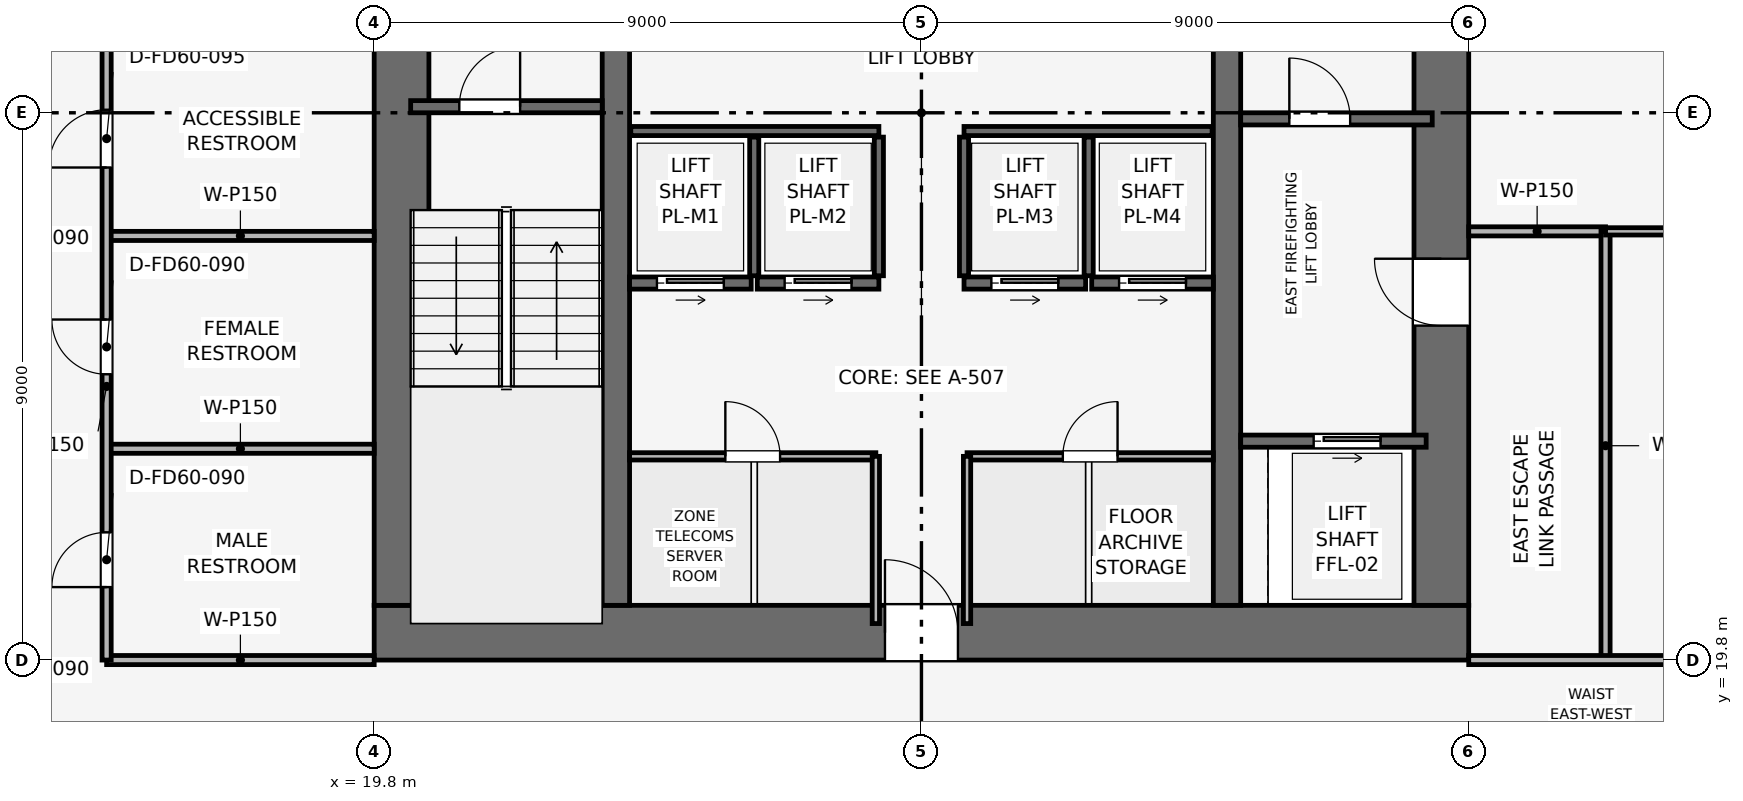
"""IFC4 building model, lengths in metres.
Left out: names, types, materials, properties, quantities, classifications, styles, units other than length and angle.
Written with IfcOpenShell. Run it as: python <this file> out.ifc"""

import sys

from ifc_helpers import new_model, si_unit, direction, frame, frame_2d, origin, place, context, subcontext, project, spatial, rectangle, extrude, element, fill, save


model = new_model("IFC4")
c1 = context("Model", 3, precision=1e-05, world=origin(), true_north=direction((0.0, 1.0)))
c2 = subcontext(c1, "Body", "Model", "MODEL_VIEW")
j1 = project(units=[si_unit("LENGTHUNIT", "METRE"), si_unit("PLANEANGLEUNIT", "RADIAN")], contexts=[c1])
p1 = place(None, origin())
s1 = spatial("IfcSite", under=j1, at=p1, CompositionType="ELEMENT")
p2 = place(p1, origin())
s2 = spatial("IfcBuilding", under=s1, at=p2, CompositionType="ELEMENT")
p3 = place(p2, frame((0.0, 0.0, 160.8)))
s3 = spatial("IfcBuildingStorey", under=s2, at=p3, CompositionType="ELEMENT", Elevation=160.8)
p4 = place(p3, frame((19.8, 20.25, 0.0), z_axis=(0.0, 0.0, 1.0), x_axis=(1.0, 0.0, 0.0)))
e1 = element("IfcWall", 1, at=p4, inside=s3, PredefinedType="SHEAR", context=c2, shape_type="SweptSolid", body=[
    extrude(rectangle(XDim=18.0, YDim=0.9, at=frame_2d((9.0, 0.0))), origin(), (0.0, 0.0, 1.0), 3.75),
])
p5 = place(p4, frame((8.4, 0.0, 0.0)))
e2 = element("IfcOpeningElement", 2, at=p5, cuts=e1, PredefinedType="OPENING", context=c2, shape_type="SweptSolid", body=[
    extrude(rectangle(XDim=1.2, YDim=2.2, at=frame_2d((0.6, 1.1))), frame((0.0, 0.46, 0.0), z_axis=(0.0, -1.0, 0.0), x_axis=(1.0, 0.0, 0.0)), (0.0, 0.0, 1.0), 0.92),
])
p6 = place(p3, frame((20.25, 20.7, 0.0), z_axis=(0.0, 0.0, 1.0), x_axis=(0.0, 1.0, 0.0)))
e3 = element("IfcWall", 3, at=p6, inside=s3, PredefinedType="SHEAR", context=c2, shape_type="SweptSolid", body=[
    extrude(rectangle(XDim=16.2, YDim=0.9, at=frame_2d((8.1, 0.0))), origin(), (0.0, 0.0, 1.0), 3.75),
])
p7 = place(p6, frame((10.1, 0.0, 0.0)))
e4 = element("IfcOpeningElement", 4, at=p7, cuts=e3, PredefinedType="OPENING", context=c2, shape_type="SweptSolid", body=[
    extrude(rectangle(XDim=1.1, YDim=2.15, at=frame_2d((0.55, 1.075))), frame((0.0, 0.46, 0.0), z_axis=(0.0, -1.0, 0.0), x_axis=(1.0, 0.0, 0.0)), (0.0, 0.0, 1.0), 0.92),
])
p8 = place(p3, frame((37.35, 20.7, 0.0), z_axis=(0.0, 0.0, 1.0), x_axis=(0.0, 1.0, 0.0)))
e5 = element("IfcWall", 5, at=p8, inside=s3, PredefinedType="SHEAR", context=c2, shape_type="SweptSolid", body=[
    extrude(rectangle(XDim=16.2, YDim=0.9, at=frame_2d((8.1, 0.0))), origin(), (0.0, 0.0, 1.0), 3.75),
])
p9 = place(p8, frame((4.6, 0.0, 0.0)))
e6 = element("IfcOpeningElement", 6, at=p9, cuts=e5, PredefinedType="OPENING", context=c2, shape_type="SweptSolid", body=[
    extrude(rectangle(XDim=1.1, YDim=2.15, at=frame_2d((0.55, 1.075))), frame((0.0, 0.46, 0.0), z_axis=(0.0, -1.0, 0.0), x_axis=(1.0, 0.0, 0.0)), (0.0, 0.0, 1.0), 0.92),
])
for number, where, z_axis, x_axis in (
    (7, (23.775, 20.7, 0.0), (0.0, 0.0, 1.0), (0.0, 1.0, 0.0)),
    (8, (33.825, 20.7, 0.0), (0.0, 0.0, 1.0), (0.0, 1.0, 0.0)),
):
    element("IfcWall", number, at=place(p3, frame(where, z_axis=z_axis, x_axis=x_axis)), inside=s3, PredefinedType="SHEAR", context=c2, shape_type="SweptSolid", body=[
        extrude(rectangle(XDim=16.2, YDim=0.45, at=frame_2d((8.1, 0.0))), origin(), (0.0, 0.0, 1.0), 3.75),
    ])
p10 = place(p3, frame((20.4, 28.9, 0.0), z_axis=(0.0, 0.0, 1.0), x_axis=(1.0, 0.0, 0.0)))
e9 = element("IfcWall", 9, at=p10, inside=s3, PredefinedType="SHEAR", context=c2, shape_type="SweptSolid", body=[
    extrude(rectangle(XDim=3.15, YDim=0.2, at=frame_2d((1.575, 0.0))), origin(), (0.0, 0.0, 1.0), 3.495),
])
p11 = place(p10, frame((0.8, 0.0, 0.0)))
e10 = element("IfcOpeningElement", 10, at=p11, cuts=e9, PredefinedType="OPENING", context=c2, shape_type="SweptSolid", body=[
    extrude(rectangle(XDim=1.0, YDim=2.1, at=frame_2d((0.5, 1.05))), frame((0.0, 0.11, 0.0), z_axis=(0.0, -1.0, 0.0), x_axis=(1.0, 0.0, 0.0)), (0.0, 0.0, 1.0), 0.22),
])
p12 = place(p3, frame((34.05, 28.7, 0.0), z_axis=(0.0, 0.0, 1.0), x_axis=(1.0, 0.0, 0.0)))
e11 = element("IfcWall", 11, at=p12, inside=s3, PredefinedType="SHEAR", context=c2, shape_type="SweptSolid", body=[
    extrude(rectangle(XDim=3.15, YDim=0.2, at=frame_2d((1.575, 0.0))), origin(), (0.0, 0.0, 1.0), 3.495),
])
p13 = place(p12, frame((0.8, 0.0, 0.0)))
e12 = element("IfcOpeningElement", 12, at=p13, cuts=e11, PredefinedType="OPENING", context=c2, shape_type="SweptSolid", body=[
    extrude(rectangle(XDim=1.0, YDim=2.1, at=frame_2d((0.5, 1.05))), frame((0.0, 0.11, 0.0), z_axis=(0.0, -1.0, 0.0), x_axis=(1.0, 0.0, 0.0)), (0.0, 0.0, 1.0), 0.22),
])
p14 = place(p3, frame((34.05, 23.4, 0.0), z_axis=(0.0, 0.0, 1.0), x_axis=(1.0, 0.0, 0.0)))
e13 = element("IfcWall", 13, at=p14, inside=s3, PredefinedType="SHEAR", context=c2, shape_type="SweptSolid", body=[
    extrude(rectangle(XDim=3.05, YDim=0.2, at=frame_2d((1.525, 0.0))), origin(), (0.0, 0.0, 1.0), 3.495),
])
p15 = place(p14, frame((1.2, 0.0, 0.0)))
e14 = element("IfcOpeningElement", 14, at=p15, cuts=e13, PredefinedType="OPENING", context=c2, shape_type="SweptSolid", body=[
    extrude(rectangle(XDim=1.1, YDim=2.15, at=frame_2d((0.55, 1.075))), frame((0.0, 0.11, 0.0), z_axis=(0.0, -1.0, 0.0), x_axis=(1.0, 0.0, 0.0)), (0.0, 0.0, 1.0), 0.22),
])
p16 = place(p3, frame((24.0, 26.0, 0.0), z_axis=(0.0, 0.0, 1.0), x_axis=(1.0, 0.0, 0.0)))
e15 = element("IfcWall", 15, at=p16, inside=s3, PredefinedType="SHEAR", context=c2, shape_type="SweptSolid", body=[
    extrude(rectangle(XDim=2.0, YDim=0.2, at=frame_2d((1.0, 0.0))), origin(), (0.0, 0.0, 1.0), 3.495),
])
p17 = place(p16, frame((0.45, 0.0, 0.0)))
e16 = element("IfcOpeningElement", 16, at=p17, cuts=e15, PredefinedType="OPENING", context=c2, shape_type="SweptSolid", body=[
    extrude(rectangle(XDim=1.1, YDim=2.15, at=frame_2d((0.55, 1.075))), frame((0.0, 0.11, 0.0), z_axis=(0.0, -1.0, 0.0), x_axis=(1.0, 0.0, 0.0)), (0.0, 0.0, 1.0), 0.22),
])
p18 = place(p3, frame((26.1, 26.0, 0.0), z_axis=(0.0, 0.0, 1.0), x_axis=(1.0, 0.0, 0.0)))
e17 = element("IfcWall", 17, at=p18, inside=s3, PredefinedType="SHEAR", context=c2, shape_type="SweptSolid", body=[
    extrude(rectangle(XDim=2.0, YDim=0.2, at=frame_2d((1.0, 0.0))), origin(), (0.0, 0.0, 1.0), 3.495),
])
p19 = place(p18, frame((0.45, 0.0, 0.0)))
e18 = element("IfcOpeningElement", 18, at=p19, cuts=e17, PredefinedType="OPENING", context=c2, shape_type="SweptSolid", body=[
    extrude(rectangle(XDim=1.1, YDim=2.15, at=frame_2d((0.55, 1.075))), frame((0.0, 0.11, 0.0), z_axis=(0.0, -1.0, 0.0), x_axis=(1.0, 0.0, 0.0)), (0.0, 0.0, 1.0), 0.22),
])
p20 = place(p3, frame((29.5, 26.0, 0.0), z_axis=(0.0, 0.0, 1.0), x_axis=(1.0, 0.0, 0.0)))
e19 = element("IfcWall", 19, at=p20, inside=s3, PredefinedType="SHEAR", context=c2, shape_type="SweptSolid", body=[
    extrude(rectangle(XDim=2.0, YDim=0.2, at=frame_2d((1.0, 0.0))), origin(), (0.0, 0.0, 1.0), 3.495),
])
p21 = place(p20, frame((0.45, 0.0, 0.0)))
e20 = element("IfcOpeningElement", 20, at=p21, cuts=e19, PredefinedType="OPENING", context=c2, shape_type="SweptSolid", body=[
    extrude(rectangle(XDim=1.1, YDim=2.15, at=frame_2d((0.55, 1.075))), frame((0.0, 0.11, 0.0), z_axis=(0.0, -1.0, 0.0), x_axis=(1.0, 0.0, 0.0)), (0.0, 0.0, 1.0), 0.22),
])
p22 = place(p3, frame((31.6, 26.0, 0.0), z_axis=(0.0, 0.0, 1.0), x_axis=(1.0, 0.0, 0.0)))
e21 = element("IfcWall", 21, at=p22, inside=s3, PredefinedType="SHEAR", context=c2, shape_type="SweptSolid", body=[
    extrude(rectangle(XDim=2.0, YDim=0.2, at=frame_2d((1.0, 0.0))), origin(), (0.0, 0.0, 1.0), 3.495),
])
p23 = place(p22, frame((0.45, 0.0, 0.0)))
e22 = element("IfcOpeningElement", 22, at=p23, cuts=e21, PredefinedType="OPENING", context=c2, shape_type="SweptSolid", body=[
    extrude(rectangle(XDim=1.1, YDim=2.15, at=frame_2d((0.55, 1.075))), frame((0.0, 0.11, 0.0), z_axis=(0.0, -1.0, 0.0), x_axis=(1.0, 0.0, 0.0)), (0.0, 0.0, 1.0), 0.22),
])
for number, where, z_axis, x_axis in (
    (23, (24.02, 28.5, 0.0), (0.0, 0.0, 1.0), (1.0, 0.0, 0.0)),
    (24, (29.5, 28.5, 0.0), (0.0, 0.0, 1.0), (1.0, 0.0, 0.0)),
):
    element("IfcWall", number, at=place(p3, frame(where, z_axis=z_axis, x_axis=x_axis)), inside=s3, PredefinedType="SHEAR", context=c2, shape_type="SweptSolid", body=[
        extrude(rectangle(XDim=4.08, YDim=0.15, at=frame_2d((2.04, 0.0))), origin(), (0.0, 0.0, 1.0), 3.495),
    ])
for number, where, z_axis, x_axis in (
    (25, (26.05, 26.12, 0.0), (0.0, 0.0, 1.0), (0.0, 1.0, 0.0)),
    (26, (28.1, 26.12, 0.0), (0.0, 0.0, 1.0), (0.0, 1.0, 0.0)),
    (27, (29.5, 26.12, 0.0), (0.0, 0.0, 1.0), (0.0, 1.0, 0.0)),
    (28, (31.55, 26.12, 0.0), (0.0, 0.0, 1.0), (0.0, 1.0, 0.0)),
):
    element("IfcWall", number, at=place(p3, frame(where, z_axis=z_axis, x_axis=x_axis)), inside=s3, PredefinedType="SHEAR", context=c2, shape_type="SweptSolid", body=[
        extrude(rectangle(XDim=2.28, YDim=0.15, at=frame_2d((1.14, 0.0))), origin(), (0.0, 0.0, 1.0), 3.495),
    ])
p24 = place(p3, frame((24.0, 23.15, 0.0), z_axis=(0.0, 0.0, 1.0), x_axis=(1.0, 0.0, 0.0)))
e29 = element("IfcWall", 29, at=p24, inside=s3, PredefinedType="PARTITIONING", context=c2, shape_type="SweptSolid", body=[
    extrude(rectangle(XDim=4.05, YDim=0.12, at=frame_2d((2.025, 0.0))), origin(), (0.0, 0.0, 1.0), 3.495),
])
p25 = place(p24, frame((1.575, 0.0, 0.0)))
e30 = element("IfcOpeningElement", 30, at=p25, cuts=e29, PredefinedType="OPENING", context=c2, shape_type="SweptSolid", body=[
    extrude(rectangle(XDim=0.9, YDim=2.1, at=frame_2d((0.45, 1.05))), frame((0.0, 0.07, 0.0), z_axis=(0.0, -1.0, 0.0), x_axis=(1.0, 0.0, 0.0)), (0.0, 0.0, 1.0), 0.14),
])
p26 = place(p3, frame((28.05, 20.4, 0.0), z_axis=(0.0, 0.0, 1.0), x_axis=(0.0, 1.0, 0.0)))
e31 = element("IfcWall", 31, at=p26, inside=s3, PredefinedType="PARTITIONING", context=c2, shape_type="SweptSolid", body=[
    extrude(rectangle(XDim=2.75, YDim=0.12, at=frame_2d((1.375, 0.0))), origin(), (0.0, 0.0, 1.0), 3.495),
])
p27 = place(p3, frame((29.55, 23.15, 0.0), z_axis=(0.0, 0.0, 1.0), x_axis=(1.0, 0.0, 0.0)))
e32 = element("IfcWall", 32, at=p27, inside=s3, PredefinedType="PARTITIONING", context=c2, shape_type="SweptSolid", body=[
    extrude(rectangle(XDim=4.05, YDim=0.12, at=frame_2d((2.025, 0.0))), origin(), (0.0, 0.0, 1.0), 3.495),
])
p28 = place(p27, frame((1.575, 0.0, 0.0)))
e33 = element("IfcOpeningElement", 33, at=p28, cuts=e32, PredefinedType="OPENING", context=c2, shape_type="SweptSolid", body=[
    extrude(rectangle(XDim=0.9, YDim=2.1, at=frame_2d((0.45, 1.05))), frame((0.0, 0.07, 0.0), z_axis=(0.0, -1.0, 0.0), x_axis=(1.0, 0.0, 0.0)), (0.0, 0.0, 1.0), 0.14),
])
p29 = place(p3, frame((29.55, 20.4, 0.0), z_axis=(0.0, 0.0, 1.0), x_axis=(0.0, 1.0, 0.0)))
e34 = element("IfcWall", 34, at=p29, inside=s3, PredefinedType="PARTITIONING", context=c2, shape_type="SweptSolid", body=[
    extrude(rectangle(XDim=2.75, YDim=0.12, at=frame_2d((1.375, 0.0))), origin(), (0.0, 0.0, 1.0), 3.495),
])
p30 = place(p3, frame((15.4, 19.8, 0.0), z_axis=(0.0, 0.0, 1.0), x_axis=(1.0, 0.0, 0.0)))
e35 = element("IfcWall", 35, at=p30, inside=s3, PredefinedType="PARTITIONING", context=c2, shape_type="SweptSolid", body=[
    extrude(rectangle(XDim=4.4, YDim=0.15, at=frame_2d((2.2, 0.0))), origin(), (0.0, 0.0, 1.0), 3.03),
])
for number, where, z_axis, x_axis in (
    (36, (15.4, 23.275, 0.0), (0.0, 0.0, 1.0), (1.0, 0.0, 0.0)),
    (37, (15.4, 26.775, 0.0), (0.0, 0.0, 1.0), (1.0, 0.0, 0.0)),
):
    element("IfcWall", number, at=place(p3, frame(where, z_axis=z_axis, x_axis=x_axis)), inside=s3, PredefinedType="PARTITIONING", context=c2, shape_type="SweptSolid", body=[
        extrude(rectangle(XDim=4.4, YDim=0.15, at=frame_2d((2.2, 0.0))), origin(), (0.0, 0.0, 1.0), 3.495),
    ])
p31 = place(p3, frame((15.4, 19.8, 0.0), z_axis=(0.0, 0.0, 1.0), x_axis=(0.0, 1.0, 0.0)))
e38 = element("IfcWall", 38, at=p31, inside=s3, PredefinedType="PARTITIONING", context=c2, shape_type="SweptSolid", body=[
    extrude(rectangle(XDim=10.35, YDim=0.15, at=frame_2d((5.175, 0.0))), origin(), (0.0, 0.0, 1.0), 3.03),
])
p32 = place(p31, frame((1.2, 0.0, 0.0)))
e39 = element("IfcOpeningElement", 39, at=p32, cuts=e38, PredefinedType="OPENING", context=c2, shape_type="SweptSolid", body=[
    extrude(rectangle(XDim=0.9, YDim=2.1, at=frame_2d((0.45, 1.05))), frame((0.0, 0.085, 0.0), z_axis=(0.0, -1.0, 0.0), x_axis=(1.0, 0.0, 0.0)), (0.0, 0.0, 1.0), 0.17),
])
p33 = place(p31, frame((4.7, 0.0, 0.0)))
e40 = element("IfcOpeningElement", 40, at=p33, cuts=e38, PredefinedType="OPENING", context=c2, shape_type="SweptSolid", body=[
    extrude(rectangle(XDim=0.9, YDim=2.1, at=frame_2d((0.45, 1.05))), frame((0.0, 0.085, 0.0), z_axis=(0.0, -1.0, 0.0), x_axis=(1.0, 0.0, 0.0)), (0.0, 0.0, 1.0), 0.17),
])
p34 = place(p31, frame((8.1, 0.0, 0.0)))
e41 = element("IfcOpeningElement", 41, at=p34, cuts=e38, PredefinedType="OPENING", context=c2, shape_type="SweptSolid", body=[
    extrude(rectangle(XDim=0.95, YDim=2.1, at=frame_2d((0.475, 1.05))), frame((0.0, 0.085, 0.0), z_axis=(0.0, -1.0, 0.0), x_axis=(1.0, 0.0, 0.0)), (0.0, 0.0, 1.0), 0.17),
])
p35 = place(p3, frame((37.8, 26.85, 0.0), z_axis=(0.0, 0.0, 1.0), x_axis=(1.0, 0.0, 0.0)))
e42 = element("IfcWall", 42, at=p35, inside=s3, PredefinedType="PARTITIONING", context=c2, shape_type="SweptSolid", body=[
    extrude(rectangle(XDim=2.25, YDim=0.15, at=frame_2d((1.125, 0.0))), origin(), (0.0, 0.0, 1.0), 3.495),
])
p36 = place(p3, frame((40.05, 19.8, 0.0), z_axis=(0.0, 0.0, 1.0), x_axis=(0.0, 1.0, 0.0)))
e43 = element("IfcWall", 43, at=p36, inside=s3, PredefinedType="PARTITIONING", context=c2, shape_type="SweptSolid", body=[
    extrude(rectangle(XDim=7.05, YDim=0.15, at=frame_2d((3.525, 0.0))), origin(), (0.0, 0.0, 1.0), 3.03),
])
p37 = place(p3, frame((40.05, 26.85, 0.0), z_axis=(0.0, 0.0, 1.0), x_axis=(1.0, 0.0, 0.0)))
e44 = element("IfcWall", 44, at=p37, inside=s3, PredefinedType="PARTITIONING", context=c2, shape_type="SweptSolid", body=[
    extrude(rectangle(XDim=12.92, YDim=0.12, at=frame_2d((6.46, 0.0))), origin(), (0.0, 0.0, 1.0), 2.98),
])
p38 = place(p37, frame((6.01, 0.0, 0.0)))
e45 = element("IfcOpeningElement", 45, at=p38, cuts=e44, PredefinedType="OPENING", context=c2, shape_type="SweptSolid", body=[
    extrude(rectangle(XDim=0.9, YDim=2.1, at=frame_2d((0.45, 1.05))), frame((0.0, 0.07, 0.0), z_axis=(0.0, -1.0, 0.0), x_axis=(1.0, 0.0, 0.0)), (0.0, 0.0, 1.0), 0.14),
])
p39 = place(p3, frame((37.8, 19.8, 0.0), z_axis=(0.0, 0.0, 1.0), x_axis=(1.0, 0.0, 0.0)))
e46 = element("IfcWall", 46, at=p39, inside=s3, PredefinedType="PARTITIONING", context=c2, shape_type="SweptSolid", body=[
    extrude(rectangle(XDim=15.17, YDim=0.15, at=frame_2d((7.585, 0.0))), origin(), (0.0, 0.0, 1.0), 2.98),
])
p40 = place(p39, frame((4.4, 0.0, 0.0)))
e47 = element("IfcOpeningElement", 47, at=p40, cuts=e46, PredefinedType="OPENING", context=c2, shape_type="SweptSolid", body=[
    extrude(rectangle(XDim=0.9, YDim=2.1, at=frame_2d((0.45, 1.05))), frame((0.0, 0.085, 0.0), z_axis=(0.0, -1.0, 0.0), x_axis=(1.0, 0.0, 0.0)), (0.0, 0.0, 1.0), 0.17),
])
p41 = place(p11, origin())
e48 = element("IfcDoor", 48, at=p41, inside=s3, OperationType="SINGLE_SWING_RIGHT", PredefinedType="DOOR", context=c2, shape_type="SweptSolid", body=[
    extrude(rectangle(XDim=1.0, YDim=2.1, at=frame_2d((0.5, 1.05))), frame((0.0, 0.025, 0.0), z_axis=(0.0, -1.0, 0.0), x_axis=(1.0, 0.0, 0.0)), (0.0, 0.0, 1.0), 0.05),
])
fill(e10, e48)
p42 = place(p13, origin())
e49 = element("IfcDoor", 49, at=p42, inside=s3, OperationType="SINGLE_SWING_LEFT", PredefinedType="DOOR", context=c2, shape_type="SweptSolid", body=[
    extrude(rectangle(XDim=1.0, YDim=2.1, at=frame_2d((0.5, 1.05))), frame((0.0, 0.025, 0.0), z_axis=(0.0, -1.0, 0.0), x_axis=(1.0, 0.0, 0.0)), (0.0, 0.0, 1.0), 0.05),
])
fill(e12, e49)
p43 = place(p15, origin())
e50 = element("IfcDoor", 50, at=p43, inside=s3, OperationType="SLIDING_TO_RIGHT", PredefinedType="DOOR", context=c2, shape_type="SweptSolid", body=[
    extrude(rectangle(XDim=1.1, YDim=2.15, at=frame_2d((0.55, 1.075))), frame((0.0, 0.025, 0.0), z_axis=(0.0, -1.0, 0.0), x_axis=(1.0, 0.0, 0.0)), (0.0, 0.0, 1.0), 0.05),
])
fill(e14, e50)
p44 = place(p17, origin())
e51 = element("IfcDoor", 51, at=p44, inside=s3, OperationType="SLIDING_TO_RIGHT", PredefinedType="DOOR", context=c2, shape_type="SweptSolid", body=[
    extrude(rectangle(XDim=1.1, YDim=2.15, at=frame_2d((0.55, 1.075))), frame((0.0, 0.025, 0.0), z_axis=(0.0, -1.0, 0.0), x_axis=(1.0, 0.0, 0.0)), (0.0, 0.0, 1.0), 0.05),
])
fill(e16, e51)
p45 = place(p19, origin())
e52 = element("IfcDoor", 52, at=p45, inside=s3, OperationType="SLIDING_TO_RIGHT", PredefinedType="DOOR", context=c2, shape_type="SweptSolid", body=[
    extrude(rectangle(XDim=1.1, YDim=2.15, at=frame_2d((0.55, 1.075))), frame((0.0, 0.025, 0.0), z_axis=(0.0, -1.0, 0.0), x_axis=(1.0, 0.0, 0.0)), (0.0, 0.0, 1.0), 0.05),
])
fill(e18, e52)
p46 = place(p21, origin())
e53 = element("IfcDoor", 53, at=p46, inside=s3, OperationType="SLIDING_TO_RIGHT", PredefinedType="DOOR", context=c2, shape_type="SweptSolid", body=[
    extrude(rectangle(XDim=1.1, YDim=2.15, at=frame_2d((0.55, 1.075))), frame((0.0, 0.025, 0.0), z_axis=(0.0, -1.0, 0.0), x_axis=(1.0, 0.0, 0.0)), (0.0, 0.0, 1.0), 0.05),
])
fill(e20, e53)
p47 = place(p23, origin())
e54 = element("IfcDoor", 54, at=p47, inside=s3, OperationType="SLIDING_TO_RIGHT", PredefinedType="DOOR", context=c2, shape_type="SweptSolid", body=[
    extrude(rectangle(XDim=1.1, YDim=2.15, at=frame_2d((0.55, 1.075))), frame((0.0, 0.025, 0.0), z_axis=(0.0, -1.0, 0.0), x_axis=(1.0, 0.0, 0.0)), (0.0, 0.0, 1.0), 0.05),
])
fill(e22, e54)
p48 = place(p25, origin())
e55 = element("IfcDoor", 55, at=p48, inside=s3, OperationType="SINGLE_SWING_LEFT", PredefinedType="DOOR", context=c2, shape_type="SweptSolid", body=[
    extrude(rectangle(XDim=0.9, YDim=2.1, at=frame_2d((0.45, 1.05))), frame((0.0, 0.025, 0.0), z_axis=(0.0, -1.0, 0.0), x_axis=(1.0, 0.0, 0.0)), (0.0, 0.0, 1.0), 0.05),
])
fill(e30, e55)
p49 = place(p28, origin())
e56 = element("IfcDoor", 56, at=p49, inside=s3, OperationType="SINGLE_SWING_RIGHT", PredefinedType="DOOR", context=c2, shape_type="SweptSolid", body=[
    extrude(rectangle(XDim=0.9, YDim=2.1, at=frame_2d((0.45, 1.05))), frame((0.0, 0.025, 0.0), z_axis=(0.0, -1.0, 0.0), x_axis=(1.0, 0.0, 0.0)), (0.0, 0.0, 1.0), 0.05),
])
fill(e33, e56)
p50 = place(p32, origin())
e57 = element("IfcDoor", 57, at=p50, inside=s3, OperationType="SINGLE_SWING_LEFT", PredefinedType="DOOR", context=c2, shape_type="SweptSolid", body=[
    extrude(rectangle(XDim=0.9, YDim=2.1, at=frame_2d((0.45, 1.05))), frame((0.0, 0.025, 0.0), z_axis=(0.0, -1.0, 0.0), x_axis=(1.0, 0.0, 0.0)), (0.0, 0.0, 1.0), 0.05),
])
fill(e39, e57)
p51 = place(p33, origin())
e58 = element("IfcDoor", 58, at=p51, inside=s3, OperationType="SINGLE_SWING_RIGHT", PredefinedType="DOOR", context=c2, shape_type="SweptSolid", body=[
    extrude(rectangle(XDim=0.9, YDim=2.1, at=frame_2d((0.45, 1.05))), frame((0.0, 0.025, 0.0), z_axis=(0.0, -1.0, 0.0), x_axis=(1.0, 0.0, 0.0)), (0.0, 0.0, 1.0), 0.05),
])
fill(e40, e58)
p52 = place(p34, origin())
e59 = element("IfcDoor", 59, at=p52, inside=s3, OperationType="SINGLE_SWING_LEFT", PredefinedType="DOOR", context=c2, shape_type="SweptSolid", body=[
    extrude(rectangle(XDim=0.95, YDim=2.1, at=frame_2d((0.475, 1.05))), frame((0.0, 0.025, 0.0), z_axis=(0.0, -1.0, 0.0), x_axis=(1.0, 0.0, 0.0)), (0.0, 0.0, 1.0), 0.05),
])
fill(e41, e59)
p53 = place(p9, origin())
e60 = element("IfcDoor", 60, at=p53, inside=s3, OperationType="SINGLE_SWING_RIGHT", PredefinedType="DOOR", context=c2, shape_type="SweptSolid", body=[
    extrude(rectangle(XDim=1.1, YDim=2.15, at=frame_2d((0.55, 1.075))), frame((0.0, 0.025, 0.0), z_axis=(0.0, -1.0, 0.0), x_axis=(1.0, 0.0, 0.0)), (0.0, 0.0, 1.0), 0.05),
])
fill(e6, e60)
p54 = place(p5, origin())
e61 = element("IfcDoor", 61, at=p54, inside=s3, OperationType="SINGLE_SWING_LEFT", PredefinedType="DOOR", context=c2, shape_type="SweptSolid", body=[
    extrude(rectangle(XDim=1.2, YDim=2.2, at=frame_2d((0.6, 1.1))), frame((0.0, 0.025, 0.0), z_axis=(0.0, -1.0, 0.0), x_axis=(1.0, 0.0, 0.0)), (0.0, 0.0, 1.0), 0.05),
])
fill(e2, e61)
save(model, sys.argv[1])
